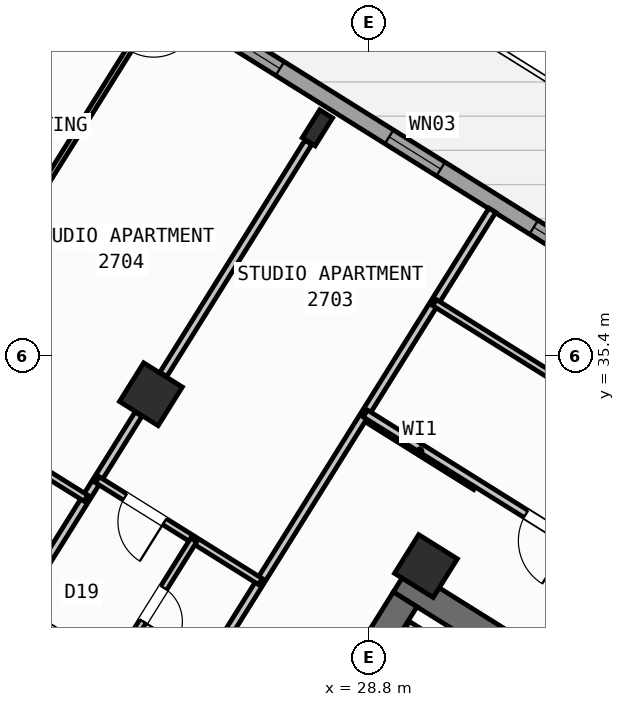
"""IFC4 building model, lengths in metres.
Left out: names, types, materials, properties, quantities, classifications, styles, units other than length and angle.
Written with IfcOpenShell. Run it as: python <this file> out.ifc"""

import sys

from ifc_helpers import new_model, si_unit, direction, frame, frame_2d, origin, origin_2d, place, context, subcontext, project, spatial, rectangle, hollow_rectangle, i_section, extrude, source, transform, mapped, element, fill, save


model = new_model("IFC4")
c1 = context("Model", 3, precision=1e-05, world=origin(), true_north=direction((0.0, 1.0)))
c2 = subcontext(c1, "Body", "Model", "MODEL_VIEW")
j1 = project(units=[si_unit("LENGTHUNIT", "METRE"), si_unit("PLANEANGLEUNIT", "RADIAN")], contexts=[c1])
p1 = place(None, origin())
s1 = spatial("IfcSite", under=j1, at=p1, CompositionType="ELEMENT")
p2 = place(p1, origin())
s2 = spatial("IfcBuilding", under=s1, at=p2, CompositionType="ELEMENT")
p3 = place(p2, frame((0.0, 0.0, 108.9)))
s3 = spatial("IfcBuildingStorey", under=s2, at=p3, CompositionType="ELEMENT", Elevation=108.9)
p4 = place(p3, frame((40.573, 24.01, 0.0), z_axis=(0.0, 0.0, 1.0), x_axis=(-0.848047359947, 0.529920442413, 0.0)))
e1 = element("IfcWall", 1, at=p4, inside=s3, PredefinedType="SHEAR", context=c2, shape_type="SweptSolid", body=[
    extrude(rectangle(XDim=13.14, YDim=0.55, at=frame_2d((6.57, 0.0))), origin(), (0.0, 0.0, 1.0), 3.35),
])
p5 = place(p3, frame((29.517, 30.594, 0.0), z_axis=(0.0, 0.0, 1.0), x_axis=(-0.529906864564, -0.848055844204, 0.0)))
e2 = element("IfcWall", 2, at=p5, inside=s3, PredefinedType="SHEAR", context=c2, shape_type="SweptSolid", body=[
    extrude(rectangle(XDim=3.575, YDim=0.55, at=frame_2d((1.788, 0.0))), origin(), (0.0, 0.0, 1.0), 3.35),
])
m1 = source(origin(), c2, "Body", "SweptSolid", [
    extrude(hollow_rectangle(XDim=0.9, YDim=0.9, WallThickness=0.036, at=origin_2d()), origin(), (0.0, 0.0, 1.0), 3.6),
])
p6 = place(p3, frame((29.928, 31.251, 0.0), z_axis=(0.0, 0.0, 1.0), x_axis=(-0.848048096156, 0.529919264233, 0.0)))
e3 = element("IfcColumn", 3, at=p6, inside=s3, PredefinedType="COLUMN", context=c2, shape_type="MappedRepresentation", body=[
    mapped(m1, transform((0.0, 0.0, 0.0), scale=1.0)),
])
m2 = source(origin(), c2, "Body", "SweptSolid", [
    extrude(i_section(OverallWidth=0.3, OverallDepth=0.65, WebThickness=0.016, FlangeThickness=0.031, at=origin_2d()), origin(), (0.0, 0.0, 1.0), 3.6),
])
p7 = place(p3, frame((27.786, 39.901, 0.0), z_axis=(0.0, 0.0, 1.0), x_axis=(-0.848048096156, 0.529919264233, 0.0)))
e4 = element("IfcColumn", 4, at=p7, inside=s3, PredefinedType="COLUMN", context=c2, shape_type="MappedRepresentation", body=[
    mapped(m2, transform((0.0, 0.0, 0.0), scale=1.0)),
])
p8 = place(p3, frame((24.5, 34.643, 0.0), z_axis=(0.0, 0.0, 1.0), x_axis=(-0.848048096156, 0.529919264233, 0.0)))
e5 = element("IfcColumn", 5, at=p8, inside=s3, PredefinedType="COLUMN", context=c2, shape_type="MappedRepresentation", body=[
    mapped(m1, transform((0.0, 0.0, 0.0), scale=1.0)),
])
p9 = place(p3, frame((17.424, 47.083, 0.0), z_axis=(0.0, 0.0, 1.0), x_axis=(0.848049927979, -0.529916332693, 0.0)))
e6 = element("IfcWall", 6, at=p9, inside=s3, PredefinedType="STANDARD", context=c2, shape_type="SweptSolid", body=[
    extrude(rectangle(XDim=29.223, YDim=0.32, at=frame_2d((14.612, 0.0))), origin(), (0.0, 0.0, 1.0), 3.35),
])
p10 = place(p9, frame((3.77, 0.0, 0.0)))
e7 = element("IfcOpeningElement", 7, at=p10, cuts=e6, PredefinedType="OPENING", context=c2, shape_type="SweptSolid", body=[
    extrude(rectangle(XDim=1.05, YDim=2.15, at=frame_2d((0.525, 1.075))), frame((0.0, 0.17, 0.0), z_axis=(0.0, -1.0, 0.0), x_axis=(1.0, 0.0, 0.0)), (0.0, 0.0, 1.0), 0.34),
])
p11 = place(p9, frame((0.9, 0.0, 0.8)))
e8 = element("IfcOpeningElement", 8, at=p11, cuts=e6, PredefinedType="OPENING", context=c2, shape_type="SweptSolid", body=[
    extrude(rectangle(XDim=2.1, YDim=1.55, at=frame_2d((1.05, 0.775))), frame((0.0, 0.17, 0.0), z_axis=(0.0, -1.0, 0.0), x_axis=(1.0, 0.0, 0.0)), (0.0, 0.0, 1.0), 0.34),
])
p12 = place(p9, frame((6.972, 0.0, 1.0)))
e9 = element("IfcOpeningElement", 9, at=p12, cuts=e6, PredefinedType="OPENING", context=c2, shape_type="SweptSolid", body=[
    extrude(rectangle(XDim=0.9, YDim=1.25, at=frame_2d((0.45, 0.625))), frame((0.0, 0.17, 0.0), z_axis=(0.0, -1.0, 0.0), x_axis=(1.0, 0.0, 0.0)), (0.0, 0.0, 1.0), 0.34),
])
p13 = place(p9, frame((9.847, 0.0, 0.85)))
e10 = element("IfcOpeningElement", 10, at=p13, cuts=e6, PredefinedType="OPENING", context=c2, shape_type="SweptSolid", body=[
    extrude(rectangle(XDim=1.5, YDim=1.5, at=frame_2d((0.75, 0.75))), frame((0.0, 0.17, 0.0), z_axis=(0.0, -1.0, 0.0), x_axis=(1.0, 0.0, 0.0)), (0.0, 0.0, 1.0), 0.34),
])
p14 = place(p9, frame((13.889, 0.0, 0.95)))
e11 = element("IfcOpeningElement", 11, at=p14, cuts=e6, PredefinedType="OPENING", context=c2, shape_type="SweptSolid", body=[
    extrude(rectangle(XDim=1.2, YDim=1.4, at=frame_2d((0.6, 0.7))), frame((0.0, 0.17, 0.0), z_axis=(0.0, -1.0, 0.0), x_axis=(1.0, 0.0, 0.0)), (0.0, 0.0, 1.0), 0.34),
])
p15 = place(p9, frame((17.254, 0.0, 1.0)))
e12 = element("IfcOpeningElement", 12, at=p15, cuts=e6, PredefinedType="OPENING", context=c2, shape_type="SweptSolid", body=[
    extrude(rectangle(XDim=0.9, YDim=1.25, at=frame_2d((0.45, 0.625))), frame((0.0, 0.17, 0.0), z_axis=(0.0, -1.0, 0.0), x_axis=(1.0, 0.0, 0.0)), (0.0, 0.0, 1.0), 0.34),
])
p16 = place(p9, frame((20.764, 0.0, 0.8)))
e13 = element("IfcOpeningElement", 13, at=p16, cuts=e6, PredefinedType="OPENING", context=c2, shape_type="SweptSolid", body=[
    extrude(rectangle(XDim=2.1, YDim=1.55, at=frame_2d((1.05, 0.775))), frame((0.0, 0.17, 0.0), z_axis=(0.0, -1.0, 0.0), x_axis=(1.0, 0.0, 0.0)), (0.0, 0.0, 1.0), 0.34),
])
p17 = place(p9, frame((25.403, 0.0, 0.8)))
e14 = element("IfcOpeningElement", 14, at=p17, cuts=e6, PredefinedType="OPENING", context=c2, shape_type="SweptSolid", body=[
    extrude(rectangle(XDim=2.1, YDim=1.55, at=frame_2d((1.05, 0.775))), frame((0.0, 0.17, 0.0), z_axis=(0.0, -1.0, 0.0), x_axis=(1.0, 0.0, 0.0)), (0.0, 0.0, 1.0), 0.34),
])
p18 = place(p3, frame((33.363, 27.69, 0.0), z_axis=(0.0, 0.0, 1.0), x_axis=(-0.848047090064, 0.529920874315, 0.0)))
e15 = element("IfcWall", 15, at=p18, inside=s3, PredefinedType="STANDARD", context=c2, shape_type="SweptSolid", body=[
    extrude(rectangle(XDim=4.498, YDim=0.2, at=frame_2d((2.249, 0.0))), origin(), (0.0, 0.0, 1.0), 3.34),
])
p19 = place(p3, frame((30.914, 32.829, 0.0), z_axis=(0.0, 0.0, 1.0), x_axis=(-0.848008813643, 0.529982124211, 0.0)))
e16 = element("IfcWall", 16, at=p19, inside=s3, PredefinedType="PARTITIONING", context=c2, shape_type="SweptSolid", body=[
    extrude(rectangle(XDim=2.61, YDim=0.16, at=frame_2d((1.305, 0.0))), origin(), (0.0, 0.0, 1.0), 3.34),
])
p20 = place(p3, frame((31.239, 38.274, 0.0), z_axis=(0.0, 0.0, 1.0), x_axis=(-0.529925472745, -0.848044216616, 0.0)))
e17 = element("IfcWall", 17, at=p20, inside=s3, PredefinedType="PARTITIONING", context=c2, shape_type="SweptSolid", body=[
    extrude(rectangle(XDim=11.65, YDim=0.16, at=frame_2d((5.825, 0.0))), origin(), (0.0, 0.0, 1.0), 3.34),
])
p21 = place(p3, frame((25.065, 28.394, 0.0), z_axis=(0.0, 0.0, 1.0), x_axis=(-0.848048310262, 0.529918921593, 0.0)))
e18 = element("IfcWall", 18, at=p21, inside=s3, PredefinedType="PARTITIONING", context=c2, shape_type="SweptSolid", body=[
    extrude(rectangle(XDim=16.73, YDim=0.16, at=frame_2d((8.365, 0.0))), origin(), (0.0, 0.0, 1.0), 3.34),
])
p22 = place(p21, frame((2.22, 0.0, 0.0)))
e19 = element("IfcOpeningElement", 19, at=p22, cuts=e18, PredefinedType="OPENING", context=c2, shape_type="SweptSolid", body=[
    extrude(rectangle(XDim=0.86, YDim=2.05, at=frame_2d((0.43, 1.025))), frame((0.0, 0.09, 0.0), z_axis=(0.0, -1.0, 0.0), x_axis=(1.0, 0.0, 0.0)), (0.0, 0.0, 1.0), 0.18),
])
p23 = place(p21, frame((7.82, 0.0, 0.0)))
e20 = element("IfcOpeningElement", 20, at=p23, cuts=e18, PredefinedType="OPENING", context=c2, shape_type="SweptSolid", body=[
    extrude(rectangle(XDim=1.0, YDim=2.1, at=frame_2d((0.5, 1.05))), frame((0.0, 0.09, 0.0), z_axis=(0.0, -1.0, 0.0), x_axis=(1.0, 0.0, 0.0)), (0.0, 0.0, 1.0), 0.18),
])
p24 = place(p21, frame((12.95, 0.0, 0.0)))
e21 = element("IfcOpeningElement", 21, at=p24, cuts=e18, PredefinedType="OPENING", context=c2, shape_type="SweptSolid", body=[
    extrude(rectangle(XDim=1.0, YDim=2.1, at=frame_2d((0.5, 1.05))), frame((0.0, 0.09, 0.0), z_axis=(0.0, -1.0, 0.0), x_axis=(1.0, 0.0, 0.0)), (0.0, 0.0, 1.0), 0.18),
])
p25 = place(p3, frame((27.607, 39.615, 0.0), z_axis=(0.0, 0.0, 1.0), x_axis=(-0.529913610495, -0.848051628978, 0.0)))
e22 = element("IfcWall", 22, at=p25, inside=s3, PredefinedType="PARTITIONING", context=c2, shape_type="SweptSolid", body=[
    extrude(rectangle(XDim=5.401, YDim=0.16, at=frame_2d((2.7, 0.0))), origin(), (0.0, 0.0, 1.0), 2.775),
])
p26 = place(p3, frame((24.256, 34.251, 0.0), z_axis=(0.0, 0.0, 1.0), x_axis=(-0.529926399231, -0.848043637673, 0.0)))
e23 = element("IfcWall", 23, at=p26, inside=s3, PredefinedType="PARTITIONING", context=c2, shape_type="SweptSolid", body=[
    extrude(rectangle(XDim=4.538, YDim=0.16, at=frame_2d((2.269, 0.0))), origin(), (0.0, 0.0, 1.0), 2.775),
])
p27 = place(p3, frame((26.66, 30.947, 0.0), z_axis=(0.0, 0.0, 1.0), x_axis=(-0.84803087207, 0.529946827537, 0.0)))
e24 = element("IfcWall", 24, at=p27, inside=s3, PredefinedType="PLUMBINGWALL", context=c2, shape_type="SweptSolid", body=[
    extrude(rectangle(XDim=3.79, YDim=0.14, at=frame_2d((1.895, 0.0))), origin(), (0.0, 0.0, 1.0), 3.34),
])
p28 = place(p27, frame((2.23, 0.0, 0.0)))
e25 = element("IfcOpeningElement", 25, at=p28, cuts=e24, PredefinedType="OPENING", context=c2, shape_type="SweptSolid", body=[
    extrude(rectangle(XDim=0.92, YDim=2.08, at=frame_2d((0.46, 1.04))), frame((0.0, 0.08, 0.0), z_axis=(0.0, -1.0, 0.0), x_axis=(1.0, 0.0, 0.0)), (0.0, 0.0, 1.0), 0.16),
])
p29 = place(p3, frame((25.345, 31.768, 0.0), z_axis=(0.0, 0.0, 1.0), x_axis=(-0.529882284462, -0.848071202561, 0.0)))
e26 = element("IfcWall", 26, at=p29, inside=s3, PredefinedType="PLUMBINGWALL", context=c2, shape_type="SweptSolid", body=[
    extrude(rectangle(XDim=3.01, YDim=0.14, at=frame_2d((1.505, 0.0))), origin(), (0.0, 0.0, 1.0), 2.995),
])
p30 = place(p29, frame((1.115, 0.0, 0.0)))
e27 = element("IfcOpeningElement", 27, at=p30, cuts=e26, PredefinedType="OPENING", context=c2, shape_type="SweptSolid", body=[
    extrude(rectangle(XDim=0.78, YDim=2.05, at=frame_2d((0.39, 1.025))), frame((0.0, 0.08, 0.0), z_axis=(0.0, -1.0, 0.0), x_axis=(1.0, 0.0, 0.0)), (0.0, 0.0, 1.0), 0.16),
])
p31 = place(p3, frame((23.218, 32.591, 0.0), z_axis=(0.0, 0.0, 1.0), x_axis=(-0.848056163074, 0.529906354247, 0.0)))
e28 = element("IfcWall", 28, at=p31, inside=s3, PredefinedType="PLUMBINGWALL", context=c2, shape_type="SweptSolid", body=[
    extrude(rectangle(XDim=6.4, YDim=0.14, at=frame_2d((3.2, 0.0))), origin(), (0.0, 0.0, 1.0), 3.34),
])
p32 = place(p31, frame((2.824, 0.0, 0.0)))
e29 = element("IfcOpeningElement", 29, at=p32, cuts=e28, PredefinedType="OPENING", context=c2, shape_type="SweptSolid", body=[
    extrude(rectangle(XDim=0.78, YDim=2.05, at=frame_2d((0.39, 1.025))), frame((0.0, 0.08, 0.0), z_axis=(0.0, -1.0, 0.0), x_axis=(1.0, 0.0, 0.0)), (0.0, 0.0, 1.0), 0.16),
])
p33 = place(p3, frame((24.802, 42.614, 0.0), z_axis=(0.0, 0.0, 1.0), x_axis=(-0.529926099889, -0.848043824727, 0.0)))
e30 = element("IfcWall", 30, at=p33, inside=s3, PredefinedType="PARTITIONING", context=c2, shape_type="SweptSolid", body=[
    extrude(rectangle(XDim=9.34, YDim=0.11, at=frame_2d((4.67, 0.0))), origin(), (0.0, 0.0, 1.0), 3.34),
])
p34 = place(p33, frame((0.47, 0.0, 0.0)))
e31 = element("IfcOpeningElement", 31, at=p34, cuts=e30, PredefinedType="OPENING", context=c2, shape_type="SweptSolid", body=[
    extrude(rectangle(XDim=0.92, YDim=2.08, at=frame_2d((0.46, 1.04))), frame((0.0, 0.065, 0.0), z_axis=(0.0, -1.0, 0.0), x_axis=(1.0, 0.0, 0.0)), (0.0, 0.0, 1.0), 0.13),
])
p35 = place(p3, frame((41.936, 26.012, 0.0), z_axis=(0.0, 0.0, 1.0), x_axis=(-0.848051154596, 0.529914369676, 0.0)))
e32 = element("IfcWall", 32, at=p35, inside=s3, PredefinedType="PARTITIONING", context=c2, shape_type="SweptSolid", body=[
    extrude(rectangle(XDim=15.57, YDim=0.16, at=frame_2d((7.785, 0.0))), origin(), (0.0, 0.0, 1.0), 3.34),
])
p36 = place(p35, frame((10.83, 0.0, 0.0)))
e33 = element("IfcOpeningElement", 33, at=p36, cuts=e32, PredefinedType="OPENING", context=c2, shape_type="SweptSolid", body=[
    extrude(rectangle(XDim=1.0, YDim=2.1, at=frame_2d((0.5, 1.05))), frame((0.0, 0.09, 0.0), z_axis=(0.0, -1.0, 0.0), x_axis=(1.0, 0.0, 0.0)), (0.0, 0.0, 1.0), 0.18),
])
p37 = place(p3, frame((42.226, 28.873, 0.0), z_axis=(0.0, 0.0, 1.0), x_axis=(-0.848049134363, 0.529917602752, 0.0)))
e34 = element("IfcWall", 34, at=p37, inside=s3, PredefinedType="PLUMBINGWALL", context=c2, shape_type="SweptSolid", body=[
    extrude(rectangle(XDim=14.3, YDim=0.14, at=frame_2d((7.15, 0.0))), origin(), (0.0, 0.0, 1.0), 3.34),
])
p38 = place(p37, frame((9.57, 0.0, 0.0)))
e35 = element("IfcOpeningElement", 35, at=p38, cuts=e34, PredefinedType="OPENING", context=c2, shape_type="SweptSolid", body=[
    extrude(rectangle(XDim=0.92, YDim=2.08, at=frame_2d((0.46, 1.04))), frame((0.0, 0.08, 0.0), z_axis=(0.0, -1.0, 0.0), x_axis=(1.0, 0.0, 0.0)), (0.0, 0.0, 1.0), 0.16),
])
m3 = source(origin(), c2, "Body", "SweptSolid", [
    extrude(rectangle(XDim=1.5, YDim=1.5, at=frame_2d((0.75, 0.75))), frame((0.0, 0.03, 0.0), z_axis=(0.0, -1.0, 0.0), x_axis=(1.0, 0.0, 0.0)), (0.0, 0.0, 1.0), 0.06),
])
p39 = place(p13, origin())
e36 = element("IfcWindow", 36, at=p39, inside=s3, PartitioningType="SINGLE_PANEL", PredefinedType="WINDOW", context=c2, shape_type="MappedRepresentation", body=[
    mapped(m3, transform((0.0, 0.0, 0.0), scale=1.0)),
])
fill(e10, e36)
m4 = source(origin(), c2, "Body", "SweptSolid", [
    extrude(rectangle(XDim=1.2, YDim=1.4, at=frame_2d((0.6, 0.7))), frame((0.0, 0.03, 0.0), z_axis=(0.0, -1.0, 0.0), x_axis=(1.0, 0.0, 0.0)), (0.0, 0.0, 1.0), 0.06),
])
p40 = place(p14, origin())
e37 = element("IfcWindow", 37, at=p40, inside=s3, PartitioningType="SINGLE_PANEL", PredefinedType="WINDOW", context=c2, shape_type="MappedRepresentation", body=[
    mapped(m4, transform((0.0, 0.0, 0.0), scale=1.0)),
])
fill(e11, e37)
m5 = source(origin(), c2, "Body", "SweptSolid", [
    extrude(rectangle(XDim=0.9, YDim=1.25, at=frame_2d((0.45, 0.625))), frame((0.0, 0.03, 0.0), z_axis=(0.0, -1.0, 0.0), x_axis=(1.0, 0.0, 0.0)), (0.0, 0.0, 1.0), 0.06),
])
p41 = place(p15, origin())
e38 = element("IfcWindow", 38, at=p41, inside=s3, PartitioningType="SINGLE_PANEL", PredefinedType="WINDOW", context=c2, shape_type="MappedRepresentation", body=[
    mapped(m5, transform((0.0, 0.0, 0.0), scale=1.0)),
])
fill(e12, e38)
m6 = source(origin(), c2, "Body", "SweptSolid", [
    extrude(rectangle(XDim=0.92, YDim=2.08, at=frame_2d((0.46, 1.04))), frame((0.0, 0.025, 0.0), z_axis=(0.0, -1.0, 0.0), x_axis=(1.0, 0.0, 0.0)), (0.0, 0.0, 1.0), 0.05),
])
p42 = place(p28, origin())
e39 = element("IfcDoor", 39, at=p42, inside=s3, OperationType="SINGLE_SWING_LEFT", PredefinedType="DOOR", context=c2, shape_type="MappedRepresentation", body=[
    mapped(m6, transform((0.0, 0.0, 0.0), scale=1.0)),
])
fill(e25, e39)
m7 = source(origin(), c2, "Body", "SweptSolid", [
    extrude(rectangle(XDim=0.78, YDim=2.05, at=frame_2d((0.39, 1.025))), frame((0.0, 0.025, 0.0), z_axis=(0.0, -1.0, 0.0), x_axis=(1.0, 0.0, 0.0)), (0.0, 0.0, 1.0), 0.05),
])
p43 = place(p30, origin())
e40 = element("IfcDoor", 40, at=p43, inside=s3, OperationType="SINGLE_SWING_RIGHT", PredefinedType="DOOR", context=c2, shape_type="MappedRepresentation", body=[
    mapped(m7, transform((0.0, 0.0, 0.0), scale=1.0)),
])
fill(e27, e40)
m8 = source(origin(), c2, "Body", "SweptSolid", [
    extrude(rectangle(XDim=1.0, YDim=2.1, at=frame_2d((0.5, 1.05))), frame((0.0, 0.025, 0.0), z_axis=(0.0, -1.0, 0.0), x_axis=(1.0, 0.0, 0.0)), (0.0, 0.0, 1.0), 0.05),
])
p44 = place(p36, origin())
e41 = element("IfcDoor", 41, at=p44, inside=s3, OperationType="SINGLE_SWING_LEFT", PredefinedType="DOOR", context=c2, shape_type="MappedRepresentation", body=[
    mapped(m8, transform((0.0, 0.0, 0.0), scale=1.0)),
])
fill(e33, e41)
save(model, sys.argv[1])
